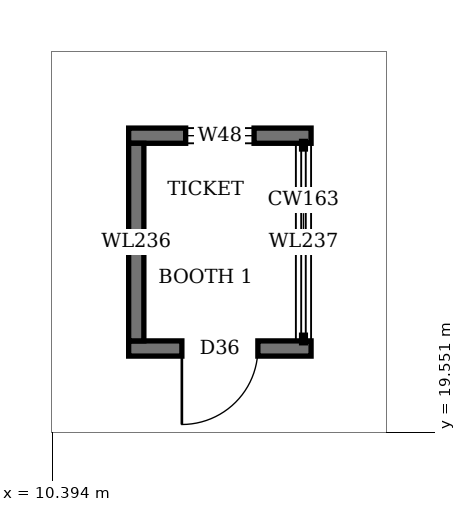
"""IFC4 building model, lengths in metres.
Left out: names, types, materials, properties, quantities, classifications, styles, units other than length and angle.
Written with IfcOpenShell. Run it as: python <this file> out.ifc"""

import sys

from ifc_helpers import new_model, si_unit, direction, frame, frame_2d, origin, place, context, subcontext, project, spatial, rectangle, extrude, element, fill, save


model = new_model("IFC4")
c1 = context("Model", 3, precision=1e-05, world=origin(), true_north=direction((0.0, 1.0)))
c2 = subcontext(c1, "Body", "Model", "MODEL_VIEW")
j1 = project(units=[si_unit("LENGTHUNIT", "METRE"), si_unit("PLANEANGLEUNIT", "RADIAN")], contexts=[c1])
p1 = place(None, origin())
s1 = spatial("IfcSite", under=j1, at=p1, CompositionType="ELEMENT")
p2 = place(p1, origin())
s2 = spatial("IfcBuilding", under=s1, at=p2, CompositionType="ELEMENT")
p3 = place(p2, origin())
s3 = spatial("IfcBuildingStorey", under=s2, at=p3, CompositionType="ELEMENT", Elevation=0.0)
p4 = place(p3, frame((11.4, 20.65, 0.0), z_axis=(0.0, 0.0, 1.0), x_axis=(1.0, 0.0, 0.0)))
e1 = element("IfcWall", 1, at=p4, inside=s3, PredefinedType="SOLIDWALL", context=c2, shape_type="SweptSolid", body=[
    extrude(rectangle(XDim=2.4, YDim=0.2, at=frame_2d((1.2, 0.0))), origin(), (0.0, 0.0, 1.0), 2.65),
])
p5 = place(p4, frame((0.7, 0.0, 0.0)))
e2 = element("IfcOpeningElement", 2, at=p5, cuts=e1, PredefinedType="OPENING", context=c2, shape_type="SweptSolid", body=[
    extrude(rectangle(XDim=1.0, YDim=2.1, at=frame_2d((0.5, 1.05))), frame((0.0, 0.11, 0.0), z_axis=(0.0, -1.0, 0.0), x_axis=(1.0, 0.0, 0.0)), (0.0, 0.0, 1.0), 0.22),
])
p6 = place(p3, frame((11.4, 23.45, 0.0), z_axis=(0.0, 0.0, 1.0), x_axis=(1.0, 0.0, 0.0)))
e3 = element("IfcWall", 3, at=p6, inside=s3, PredefinedType="SOLIDWALL", context=c2, shape_type="SweptSolid", body=[
    extrude(rectangle(XDim=2.4, YDim=0.2, at=frame_2d((1.2, 0.0))), origin(), (0.0, 0.0, 1.0), 2.65),
])
p7 = place(p6, frame((0.75, 0.0, 0.9)))
e4 = element("IfcOpeningElement", 4, at=p7, cuts=e3, PredefinedType="OPENING", context=c2, shape_type="SweptSolid", body=[
    extrude(rectangle(XDim=0.9, YDim=1.2, at=frame_2d((0.45, 0.6))), frame((0.0, 0.11, 0.0), z_axis=(0.0, -1.0, 0.0), x_axis=(1.0, 0.0, 0.0)), (0.0, 0.0, 1.0), 0.22),
])
p8 = place(p3, frame((11.5, 20.75, 0.0), z_axis=(0.0, 0.0, 1.0), x_axis=(0.0, 1.0, 0.0)))
e5 = element("IfcWall", 5, at=p8, inside=s3, PredefinedType="SOLIDWALL", context=c2, shape_type="SweptSolid", body=[
    extrude(rectangle(XDim=2.6, YDim=0.2, at=frame_2d((1.3, 0.0))), origin(), (0.0, 0.0, 1.0), 2.65),
])
p9 = place(p3, frame((13.7, 20.75, 0.0), z_axis=(0.0, 0.0, 1.0), x_axis=(0.0, 1.0, 0.0)))
e6 = element("IfcWall", 6, at=p9, inside=s3, PredefinedType="SOLIDWALL", context=c2, shape_type="SweptSolid", body=[
    extrude(rectangle(XDim=2.6, YDim=0.2, at=frame_2d((1.3, 0.0))), origin(), (0.0, 0.0, 1.0), 1.0),
])
p10 = place(p5, frame((1.0, 0.0, 0.0), z_axis=(0.0, 0.0, 1.0), x_axis=(-1.0, 0.0, 0.0)))
e7 = element("IfcDoor", 7, at=p10, inside=s3, OperationType="SINGLE_SWING_RIGHT", PredefinedType="DOOR", context=c2, shape_type="SweptSolid", body=[
    extrude(rectangle(XDim=1.0, YDim=2.1, at=frame_2d((0.5, 1.05))), frame((0.0, 0.025, 0.0), z_axis=(0.0, -1.0, 0.0), x_axis=(1.0, 0.0, 0.0)), (0.0, 0.0, 1.0), 0.05),
])
fill(e2, e7)
p11 = place(p7, origin())
e8 = element("IfcWindow", 8, at=p11, inside=s3, PartitioningType="SINGLE_PANEL", PredefinedType="WINDOW", context=c2, shape_type="SweptSolid", body=[
    extrude(rectangle(XDim=0.9, YDim=1.2, at=frame_2d((0.45, 0.6))), frame((0.0, 0.03, 0.0), z_axis=(0.0, -1.0, 0.0), x_axis=(1.0, 0.0, 0.0)), (0.0, 0.0, 1.0), 0.06),
])
fill(e4, e8)
save(model, sys.argv[1])
